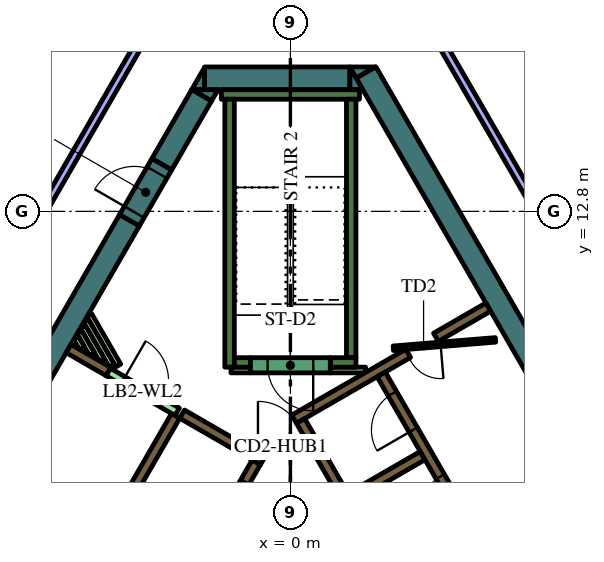
"""IFC4 building model, lengths in metres.
Left out: names, types, materials, properties, quantities, classifications, styles, units other than length and angle.
Written with IfcOpenShell. Run it as: python <this file> out.ifc"""

import sys

from ifc_helpers import new_model, si_unit, direction, frame, frame_2d, origin, place, context, subcontext, project, spatial, polyline, rectangle, outline, extrude, element, fill, save


model = new_model("IFC4")
c1 = context("Model", 3, precision=1e-05, world=origin(), true_north=direction((0.0, 1.0)))
c2 = subcontext(c1, "Body", "Model", "MODEL_VIEW")
j1 = project(units=[si_unit("LENGTHUNIT", "METRE"), si_unit("PLANEANGLEUNIT", "RADIAN")], contexts=[c1])
p1 = place(None, origin())
s1 = spatial("IfcSite", under=j1, at=p1, CompositionType="ELEMENT")
p2 = place(p1, origin())
s2 = spatial("IfcBuilding", under=s1, at=p2, CompositionType="ELEMENT")
p3 = place(p2, frame((0.0, 0.0, 279.6)))
s3 = spatial("IfcBuildingStorey", under=s2, at=p3, CompositionType="ELEMENT", Elevation=279.6)
p4 = place(p3, frame((1.989, 16.456, 0.0), z_axis=(0.0, 0.0, 1.0), x_axis=(0.49999102663, -0.8660305845, 0.0)))
e1 = element("IfcWall", 1, at=p4, inside=s3, PredefinedType="SOLIDWALL", context=c2, shape_type="SweptSolid", body=[
    extrude(rectangle(XDim=12.406, YDim=0.6, at=frame_2d((6.203, 0.0))), origin(), (0.0, 0.0, 1.0), 4.2),
])
p5 = place(p3, origin())
e2 = element("IfcWall", 2, at=p5, inside=s3, PredefinedType="SOLIDWALL", context=c2, shape_type="SweptSolid", body=[
    extrude(outline(polyline([(1.559, 16.6), (2.235, 16.6), (1.728, 16.307), (1.559, 16.6)])), origin(), (0.0, 0.0, 1.0), 4.2),
])
p6 = place(p3, frame((-2.258, 16.3, 0.0), z_axis=(0.0, 0.0, 1.0), x_axis=(1.0, 0.0, 0.0)))
e3 = element("IfcWall", 3, at=p6, inside=s3, PredefinedType="SOLIDWALL", context=c2, shape_type="SweptSolid", body=[
    extrude(rectangle(XDim=3.823, YDim=0.6, at=frame_2d((1.912, 0.0))), origin(), (0.0, 0.0, 1.0), 4.2),
])
e4 = element("IfcWall", 4, at=p5, inside=s3, PredefinedType="SOLIDWALL", context=c2, shape_type="SweptSolid", body=[
    extrude(outline(polyline([(1.905, 16.0), (1.567, 16.0), (1.567, 16.585), (1.905, 16.0)])), origin(), (0.0, 0.0, 1.0), 4.2),
])
e5 = element("IfcWall", 5, at=p5, inside=s3, PredefinedType="SOLIDWALL", context=c2, shape_type="SweptSolid", body=[
    extrude(outline(polyline([(-2.598, 16.0), (-2.26, 16.585), (-2.26, 16.0), (-2.598, 16.0)])), origin(), (0.0, 0.0, 1.0), 4.2),
])
p7 = place(p3, frame((-2.335, 15.855, 0.0), z_axis=(0.0, 0.0, 1.0), x_axis=(-0.499980971027, -0.866036389889, 0.0)))
e6 = element("IfcWall", 6, at=p7, inside=s3, PredefinedType="SOLIDWALL", context=c2, shape_type="SweptSolid", body=[
    extrude(rectangle(XDim=2.098, YDim=0.6, at=frame_2d((1.049, 0.0))), origin(), (0.0, 0.0, 1.0), 4.2),
])
e7 = element("IfcWall", 7, at=p5, inside=s3, PredefinedType="SOLIDWALL", context=c2, shape_type="SweptSolid", body=[
    extrude(outline(polyline([(-1.905, 16.0), (-2.074, 15.707), (-2.581, 16.0), (-1.905, 16.0)])), origin(), (0.0, 0.0, 1.0), 4.2),
])
p8 = place(p3, frame((-4.234, 12.566, 0.0), z_axis=(0.0, 0.0, 1.0), x_axis=(-0.499998841866, -0.866026072432, 0.0)))
e8 = element("IfcWall", 8, at=p8, inside=s3, PredefinedType="SOLIDWALL", context=c2, shape_type="SweptSolid", body=[
    extrude(rectangle(XDim=16.694, YDim=0.6, at=frame_2d((8.347, 0.0))), origin(), (0.0, 0.0, 1.0), 4.2),
])
p9 = place(p3, frame((-1.817, 15.875, 0.0), z_axis=(0.0, 0.0, 1.0), x_axis=(1.0, 0.0, 0.0)))
e9 = element("IfcWall", 9, at=p9, inside=s3, PredefinedType="SOLIDWALL", context=c2, shape_type="SweptSolid", body=[
    extrude(rectangle(XDim=3.634, YDim=0.25, at=frame_2d((1.817, 0.0))), origin(), (0.0, 0.0, 1.0), 4.2),
])
p10 = place(p3, frame((1.6, 8.95, 0.0), z_axis=(0.0, 0.0, 1.0), x_axis=(0.0, 1.0, 0.0)))
e10 = element("IfcWall", 10, at=p10, inside=s3, PredefinedType="SOLIDWALL", context=c2, shape_type="SweptSolid", body=[
    extrude(rectangle(XDim=6.8, YDim=0.25, at=frame_2d((3.4, 0.0))), origin(), (0.0, 0.0, 1.0), 4.2),
])
p11 = place(p3, frame((1.05, 8.825, 0.0), z_axis=(0.0, 0.0, 1.0), x_axis=(1.0, 0.0, 0.0)))
e11 = element("IfcWall", 11, at=p11, inside=s3, PredefinedType="SOLIDWALL", context=c2, shape_type="SweptSolid", body=[
    extrude(rectangle(XDim=0.675, YDim=0.25, at=frame_2d((0.337, 0.0))), origin(), (0.0, 0.0, 1.0), 4.2),
])
p12 = place(p3, frame((-1.6, 8.7, 0.0), z_axis=(0.0, 0.0, 1.0), x_axis=(0.0, 1.0, 0.0)))
e12 = element("IfcWall", 12, at=p12, inside=s3, PredefinedType="SOLIDWALL", context=c2, shape_type="SweptSolid", body=[
    extrude(rectangle(XDim=7.05, YDim=0.25, at=frame_2d((3.525, 0.0))), origin(), (0.0, 0.0, 1.0), 4.2),
])
p13 = place(p3, frame((-1.475, 8.825, 0.0), z_axis=(0.0, 0.0, 1.0), x_axis=(1.0, 0.0, 0.0)))
e13 = element("IfcWall", 13, at=p13, inside=s3, PredefinedType="SOLIDWALL", context=c2, shape_type="SweptSolid", body=[
    extrude(rectangle(XDim=0.425, YDim=0.25, at=frame_2d((0.212, 0.0))), origin(), (0.0, 0.0, 1.0), 4.2),
])
p14 = place(p3, frame((3.1, 9.064, 0.0), z_axis=(0.0, 0.0, 1.0), x_axis=(-0.866033137035, -0.499986605379, 0.0)))
e14 = element("IfcWall", 14, at=p14, inside=s3, PredefinedType="SOLIDWALL", context=c2, shape_type="SweptSolid", body=[
    extrude(rectangle(XDim=3.467, YDim=0.25, at=frame_2d((1.733, 0.0))), origin(), (0.0, 0.0, 1.0), 4.2),
])
p15 = place(p3, frame((0.268, 7.285, 0.0), z_axis=(0.0, 0.0, 1.0), x_axis=(0.500098681536, -0.865968422476, 0.0)))
e15 = element("IfcWall", 15, at=p15, inside=s3, PredefinedType="SOLIDWALL", context=c2, shape_type="SweptSolid", body=[
    extrude(rectangle(XDim=0.636, YDim=0.25, at=frame_2d((0.318, 0.0))), origin(), (0.0, 0.0, 1.0), 4.2),
])
p16 = place(p3, frame((5.97, -2.591, 0.0), z_axis=(0.0, 0.0, 1.0), x_axis=(-0.499994469932, 0.866028596547, 0.0)))
e16 = element("IfcWall", 16, at=p16, inside=s3, PredefinedType="SOLIDWALL", context=c2, shape_type="SweptSolid", body=[
    extrude(rectangle(XDim=10.488, YDim=0.25, at=frame_2d((5.244, 0.0))), origin(), (0.0, 0.0, 1.0), 4.2),
])
p17 = place(p3, frame((1.574, 5.274, 0.0), z_axis=(0.0, 0.0, 1.0), x_axis=(0.866028486751, 0.499994660107, 0.0)))
e17 = element("IfcWall", 17, at=p17, inside=s3, PredefinedType="SOLIDWALL", context=c2, shape_type="SweptSolid", body=[
    extrude(rectangle(XDim=2.2, YDim=0.25, at=frame_2d((1.1, 0.0))), origin(), (0.0, 0.0, 1.0), 4.2),
])
p18 = place(p3, frame((3.83, 9.486, 0.0), z_axis=(0.0, 0.0, 1.0), x_axis=(0.865986202621, 0.500067892261, 0.0)))
e18 = element("IfcWall", 18, at=p18, inside=s3, PredefinedType="SOLIDWALL", context=c2, shape_type="SweptSolid", body=[
    extrude(rectangle(XDim=1.591, YDim=0.25, at=frame_2d((0.795, 0.0))), origin(), (0.0, 0.0, 1.0), 4.2),
])
p19 = place(p3, frame((-3.02, 7.419, 0.0), z_axis=(0.0, 0.0, 1.0), x_axis=(-0.500022956343, -0.866012149528, 0.0)))
e19 = element("IfcWall", 19, at=p19, inside=s3, PredefinedType="SOLIDWALL", context=c2, shape_type="SweptSolid", body=[
    extrude(rectangle(XDim=10.08, YDim=0.25, at=frame_2d((5.04, 0.0))), origin(), (0.0, 0.0, 1.0), 4.2),
])
e20 = element("IfcWall", 20, at=p5, inside=s3, PredefinedType="SOLIDWALL", context=c2, shape_type="SweptSolid", body=[
    extrude(outline(polyline([(-2.912, 7.356), (-2.787, 7.573), (-1.232, 6.675), (-1.303, 6.675), (-1.304, 6.675), (-1.304, 6.675), (-1.304, 6.525), (-1.304, 6.525), (-1.303, 6.525), (-0.971, 6.525), (-0.665, 6.348), (-0.79, 6.132), (-1.007, 6.257), (-1.007, 6.257), (-2.912, 7.356)])), origin(), (0.0, 0.0, 1.0), 4.2),
])
p20 = place(p3, frame((-5.837, 9.19, 0.0), z_axis=(0.0, 0.0, 1.0), x_axis=(0.866024298998, -0.500001913541, 0.0)))
e21 = element("IfcWall", 21, at=p20, inside=s3, PredefinedType="SOLIDWALL", context=c2, shape_type="SweptSolid", body=[
    extrude(rectangle(XDim=1.21, YDim=0.25, at=frame_2d((0.605, 0.0))), origin(), (0.0, 0.0, 1.0), 4.2),
])
p21 = place(p3, frame((-5.294, 10.067, 0.0), z_axis=(0.0, 0.0, 1.0), x_axis=(0.500054140411, -0.865994143547, 0.0)))
e22 = element("IfcWall", 22, at=p21, inside=s3, PredefinedType="PARTITIONING", context=c2, shape_type="SweptSolid", body=[
    extrude(rectangle(XDim=1.529, YDim=0.15, at=frame_2d((0.765, 0.0))), origin(), (0.0, 0.0, 1.0), 3.55),
])
p22 = place(p3, frame((-5.381, 9.917, 0.0), z_axis=(0.0, 0.0, 1.0), x_axis=(0.500136970483, -0.865946309396, 0.0)))
e23 = element("IfcWall", 23, at=p22, inside=s3, PredefinedType="PARTITIONING", context=c2, shape_type="SweptSolid", body=[
    extrude(rectangle(XDim=1.359, YDim=0.15, at=frame_2d((0.68, 0.0))), origin(), (0.0, 0.0, 1.0), 3.55),
])
p23 = place(p3, frame((-5.467, 9.767, 0.0), z_axis=(0.0, 0.0, 1.0), x_axis=(0.500168849293, -0.86592789665, 0.0)))
e24 = element("IfcWall", 24, at=p23, inside=s3, PredefinedType="PARTITIONING", context=c2, shape_type="SweptSolid", body=[
    extrude(rectangle(XDim=1.01, YDim=0.15, at=frame_2d((0.505, 0.0))), origin(), (0.0, 0.0, 1.0), 3.55),
])
p24 = place(p3, frame((-5.554, 9.617, 0.0), z_axis=(0.0, 0.0, 1.0), x_axis=(0.500253084543, -0.86587923604, 0.0)))
e25 = element("IfcWall", 25, at=p24, inside=s3, PredefinedType="PARTITIONING", context=c2, shape_type="SweptSolid", body=[
    extrude(rectangle(XDim=0.664, YDim=0.15, at=frame_2d((0.332, 0.0))), origin(), (0.0, 0.0, 1.0), 3.55),
])
p25 = place(p3, frame((-5.64, 9.467, 0.0), z_axis=(0.0, 0.0, 1.0), x_axis=(0.499944387978, -0.86605750902, 0.0)))
e26 = element("IfcWall", 26, at=p25, inside=s3, PredefinedType="PARTITIONING", context=c2, shape_type="SweptSolid", body=[
    extrude(rectangle(XDim=0.317, YDim=0.15, at=frame_2d((0.159, 0.0))), origin(), (0.0, 0.0, 1.0), 3.55),
])
p26 = place(p3, frame((1.05, 8.625, 0.0), z_axis=(0.0, 0.0, 1.0), x_axis=(1.0, 0.0, 0.0)))
e27 = element("IfcWall", 27, at=p26, inside=s3, PredefinedType="PARTITIONING", context=c2, shape_type="SweptSolid", body=[
    extrude(rectangle(XDim=0.929, YDim=0.15, at=frame_2d((0.464, 0.0))), origin(), (0.0, 0.0, 1.0), 3.55),
])
p27 = place(p3, frame((-1.564, 8.625, 0.0), z_axis=(0.0, 0.0, 1.0), x_axis=(1.0, 0.0, 0.0)))
e28 = element("IfcWall", 28, at=p27, inside=s3, PredefinedType="PARTITIONING", context=c2, shape_type="SweptSolid", body=[
    extrude(rectangle(XDim=0.514, YDim=0.15, at=frame_2d((0.257, 0.0))), origin(), (0.0, 0.0, 1.0), 3.55),
])
p28 = place(p3, frame((8.565, -2.185, 0.0), z_axis=(0.0, 0.0, 1.0), x_axis=(-0.499997954832, 0.866026584559, 0.0)))
e29 = element("IfcWall", 29, at=p28, inside=s3, PredefinedType="SOLIDWALL", context=c2, shape_type="SweptSolid", body=[
    extrude(rectangle(XDim=12.35, YDim=0.25, at=frame_2d((6.175, 0.0))), origin(), (0.0, 0.0, 1.0), 4.2),
])
p29 = place(p28, frame((0.685, 0.0, 0.0)))
e30 = element("IfcOpeningElement", 30, at=p29, cuts=e29, PredefinedType="OPENING", context=c2, shape_type="SweptSolid", body=[
    extrude(rectangle(XDim=0.9, YDim=2.1, at=frame_2d((0.45, 1.05))), frame((0.0, 0.135, 0.0), z_axis=(0.0, -1.0, 0.0), x_axis=(1.0, 0.0, 0.0)), (0.0, 0.0, 1.0), 0.27),
])
p30 = place(p28, frame((3.105, 0.0, 0.0)))
e31 = element("IfcOpeningElement", 31, at=p30, cuts=e29, PredefinedType="OPENING", context=c2, shape_type="SweptSolid", body=[
    extrude(rectangle(XDim=1.1, YDim=2.1, at=frame_2d((0.55, 1.05))), frame((0.0, 0.135, 0.0), z_axis=(0.0, -1.0, 0.0), x_axis=(1.0, 0.0, 0.0)), (0.0, 0.0, 1.0), 0.27),
])
p31 = place(p28, frame((5.625, 0.0, 0.0)))
e32 = element("IfcOpeningElement", 32, at=p31, cuts=e29, PredefinedType="OPENING", context=c2, shape_type="SweptSolid", body=[
    extrude(rectangle(XDim=1.1, YDim=2.1, at=frame_2d((0.55, 1.05))), frame((0.0, 0.135, 0.0), z_axis=(0.0, -1.0, 0.0), x_axis=(1.0, 0.0, 0.0)), (0.0, 0.0, 1.0), 0.27),
])
p32 = place(p28, frame((8.145, 0.0, 0.0)))
e33 = element("IfcOpeningElement", 33, at=p32, cuts=e29, PredefinedType="OPENING", context=c2, shape_type="SweptSolid", body=[
    extrude(rectangle(XDim=1.1, YDim=2.1, at=frame_2d((0.55, 1.05))), frame((0.0, 0.135, 0.0), z_axis=(0.0, -1.0, 0.0), x_axis=(1.0, 0.0, 0.0)), (0.0, 0.0, 1.0), 0.27),
])
p33 = place(p28, frame((10.665, 0.0, 0.0)))
e34 = element("IfcOpeningElement", 34, at=p33, cuts=e29, PredefinedType="OPENING", context=c2, shape_type="SweptSolid", body=[
    extrude(rectangle(XDim=1.1, YDim=2.1, at=frame_2d((0.55, 1.05))), frame((0.0, 0.135, 0.0), z_axis=(0.0, -1.0, 0.0), x_axis=(1.0, 0.0, 0.0)), (0.0, 0.0, 1.0), 0.27),
])
p34 = place(p3, frame((-0.898, 6.194, 0.0), z_axis=(0.0, 0.0, 1.0), x_axis=(-0.499996202215, -0.866027596426, 0.0)))
e35 = element("IfcWall", 35, at=p34, inside=s3, PredefinedType="SOLIDWALL", context=c2, shape_type="SweptSolid", body=[
    extrude(rectangle(XDim=9.83, YDim=0.25, at=frame_2d((4.915, 0.0))), origin(), (0.0, 0.0, 1.0), 4.2),
])
p35 = place(p34, frame((0.585, 0.0, 0.0)))
e36 = element("IfcOpeningElement", 36, at=p35, cuts=e35, PredefinedType="OPENING", context=c2, shape_type="SweptSolid", body=[
    extrude(rectangle(XDim=1.1, YDim=2.1, at=frame_2d((0.55, 1.05))), frame((0.0, 0.135, 0.0), z_axis=(0.0, -1.0, 0.0), x_axis=(1.0, 0.0, 0.0)), (0.0, 0.0, 1.0), 0.27),
])
p36 = place(p34, frame((3.105, 0.0, 0.0)))
e37 = element("IfcOpeningElement", 37, at=p36, cuts=e35, PredefinedType="OPENING", context=c2, shape_type="SweptSolid", body=[
    extrude(rectangle(XDim=1.1, YDim=2.1, at=frame_2d((0.55, 1.05))), frame((0.0, 0.135, 0.0), z_axis=(0.0, -1.0, 0.0), x_axis=(1.0, 0.0, 0.0)), (0.0, 0.0, 1.0), 0.27),
])
p37 = place(p34, frame((5.625, 0.0, 0.0)))
e38 = element("IfcOpeningElement", 38, at=p37, cuts=e35, PredefinedType="OPENING", context=c2, shape_type="SweptSolid", body=[
    extrude(rectangle(XDim=1.1, YDim=2.1, at=frame_2d((0.55, 1.05))), frame((0.0, 0.135, 0.0), z_axis=(0.0, -1.0, 0.0), x_axis=(1.0, 0.0, 0.0)), (0.0, 0.0, 1.0), 0.27),
])
p38 = place(p34, frame((8.145, 0.0, 0.0)))
e39 = element("IfcOpeningElement", 39, at=p38, cuts=e35, PredefinedType="OPENING", context=c2, shape_type="SweptSolid", body=[
    extrude(rectangle(XDim=1.1, YDim=2.1, at=frame_2d((0.55, 1.05))), frame((0.0, 0.135, 0.0), z_axis=(0.0, -1.0, 0.0), x_axis=(1.0, 0.0, 0.0)), (0.0, 0.0, 1.0), 0.27),
])
p39 = place(p3, frame((1.05, 8.75, 0.0), z_axis=(0.0, 0.0, 1.0), x_axis=(-1.0, 0.0, 0.0)))
e40 = element("IfcWall", 40, at=p39, inside=s3, PredefinedType="SOLIDWALL", context=c2, shape_type="SweptSolid", body=[
    extrude(rectangle(XDim=2.1, YDim=0.4, at=frame_2d((1.05, 0.0))), origin(), (0.0, 0.0, 1.0), 4.2),
])
p40 = place(p39, frame((0.45, 0.0, 0.0)))
e41 = element("IfcOpeningElement", 41, at=p40, cuts=e40, PredefinedType="OPENING", context=c2, shape_type="SweptSolid", body=[
    extrude(rectangle(XDim=1.2, YDim=2.1, at=frame_2d((0.6, 1.05))), frame((0.0, 0.21, 0.0), z_axis=(0.0, -1.0, 0.0), x_axis=(1.0, 0.0, 0.0)), (0.0, 0.0, 1.0), 0.42),
])
p41 = place(p3, frame((5.398, 9.419, 0.0), z_axis=(0.0, 0.0, 1.0), x_axis=(-0.996653416376, -0.081743303248, 0.0)))
e42 = element("IfcWall", 42, at=p41, inside=s3, PredefinedType="PARTITIONING", context=c2, shape_type="SweptSolid", body=[
    extrude(rectangle(XDim=2.7, YDim=0.12, at=frame_2d((1.35, 0.0))), origin(), (0.0, 0.0, 1.0), 3.55),
])
p42 = place(p41, frame((1.45, 0.0, 0.0)))
e43 = element("IfcOpeningElement", 43, at=p42, cuts=e42, PredefinedType="OPENING", context=c2, shape_type="SweptSolid", body=[
    extrude(rectangle(XDim=0.9, YDim=2.1, at=frame_2d((0.45, 1.05))), frame((0.0, 0.07, 0.0), z_axis=(0.0, -1.0, 0.0), x_axis=(1.0, 0.0, 0.0)), (0.0, 0.0, 1.0), 0.14),
])
p43 = place(p3, frame((-1.303, 6.6, 0.0), z_axis=(0.0, 0.0, 1.0), x_axis=(1.0, 0.0, 0.0)))
e44 = element("IfcWall", 44, at=p43, inside=s3, PredefinedType="PARTITIONING", context=c2, shape_type="SweptSolid", body=[
    extrude(rectangle(XDim=2.1, YDim=0.15, at=frame_2d((1.05, 0.0))), origin(), (0.0, 0.0, 1.0), 4.2),
])
p44 = place(p43, frame((0.45, 0.0, 0.0)))
e45 = element("IfcOpeningElement", 45, at=p44, cuts=e44, PredefinedType="OPENING", context=c2, shape_type="SweptSolid", body=[
    extrude(rectangle(XDim=1.2, YDim=2.1, at=frame_2d((0.6, 1.05))), frame((0.0, 0.085, 0.0), z_axis=(0.0, -1.0, 0.0), x_axis=(1.0, 0.0, 0.0)), (0.0, 0.0, 1.0), 0.17),
])
p45 = place(p3, frame((-4.796, 8.575, 0.0), z_axis=(0.0, 0.0, 1.0), x_axis=(0.866009402589, -0.500027713859, 0.0)))
e46 = element("IfcWall", 46, at=p45, inside=s3, PredefinedType="PARTITIONING", context=c2, shape_type="SweptSolid", body=[
    extrude(rectangle(XDim=2.1, YDim=0.226, at=frame_2d((1.05, 0.0))), origin(), (0.0, 0.0, 1.0), 3.55),
])
p46 = place(p45, frame((0.45, 0.0, 0.0)))
e47 = element("IfcOpeningElement", 47, at=p46, cuts=e46, PredefinedType="OPENING", context=c2, shape_type="SweptSolid", body=[
    extrude(rectangle(XDim=1.2, YDim=2.1, at=frame_2d((0.6, 1.05))), frame((0.0, 0.123, 0.0), z_axis=(0.0, -1.0, 0.0), x_axis=(1.0, 0.0, 0.0)), (0.0, 0.0, 1.0), 0.246),
])
p47 = place(p3, frame((-4.234, 12.566, 0.0), z_axis=(0.0, 0.0, 1.0), x_axis=(0.500000056704, 0.866025371046, 0.0)))
e48 = element("IfcWall", 48, at=p47, inside=s3, PredefinedType="SOLIDWALL", context=c2, shape_type="SweptSolid", body=[
    extrude(rectangle(XDim=1.7, YDim=0.6, at=frame_2d((0.85, 0.0))), origin(), (0.0, 0.0, 1.0), 4.2),
])
p48 = place(p47, frame((0.25, 0.0, 0.0)))
e49 = element("IfcOpeningElement", 49, at=p48, cuts=e48, PredefinedType="OPENING", context=c2, shape_type="SweptSolid", body=[
    extrude(rectangle(XDim=1.2, YDim=2.1, at=frame_2d((0.6, 1.05))), frame((0.0, 0.31, 0.0), z_axis=(0.0, -1.0, 0.0), x_axis=(1.0, 0.0, 0.0)), (0.0, 0.0, 1.0), 0.62),
])
p49 = place(p3, frame((7.421, 11.247, 0.0), z_axis=(0.0, 0.0, 1.0), x_axis=(-0.499999024953, 0.866025966727, 0.0)))
e50 = element("IfcWall", 50, at=p49, inside=s3, PredefinedType="PARTITIONING", context=c2, shape_type="SweptSolid", body=[
    extrude(rectangle(XDim=7.769, YDim=0.2, at=frame_2d((3.884, 0.0))), origin(), (0.0, 0.0, 1.0), 3.55),
])
p50 = place(p3, frame((-7.962, 15.8, 0.0), z_axis=(0.0, 0.0, 1.0), x_axis=(0.599541489613, 0.800343677574, 0.0)))
e51 = element("IfcWall", 51, at=p50, inside=s3, PredefinedType="PARTITIONING", context=c2, shape_type="SweptSolid", body=[
    extrude(rectangle(XDim=4.942, YDim=0.15, at=frame_2d((2.471, 0.0))), origin(), (0.0, 0.0, 1.0), 3.55),
])
p51 = place(p50, frame((2.042, 0.0, 0.0)))
e52 = element("IfcOpeningElement", 52, at=p51, cuts=e51, PredefinedType="OPENING", context=c2, shape_type="SweptSolid", body=[
    extrude(rectangle(XDim=0.9, YDim=2.1, at=frame_2d((0.45, 1.05))), frame((0.0, 0.085, 0.0), z_axis=(0.0, -1.0, 0.0), x_axis=(1.0, 0.0, 0.0)), (0.0, 0.0, 1.0), 0.17),
])
p52 = place(p3, frame((-3.306, 18.374, 0.0), z_axis=(0.0, 0.0, 1.0), x_axis=(-0.499999798456, -0.866025520146, 0.0)))
e53 = element("IfcWall", 53, at=p52, inside=s3, PredefinedType="PARTITIONING", context=c2, shape_type="SweptSolid", body=[
    extrude(rectangle(XDim=8.229, YDim=0.2, at=frame_2d((4.115, 0.0))), origin(), (0.0, 0.0, 1.0), 3.55),
])
p53 = place(p32, origin())
e54 = element("IfcDoor", 54, at=p53, inside=s3, OperationType="DOUBLE_DOOR_SLIDING", PredefinedType="DOOR", context=c2, shape_type="SweptSolid", body=[
    extrude(rectangle(XDim=1.1, YDim=2.1, at=frame_2d((0.55, 1.05))), frame((0.0, 0.025, 0.0), z_axis=(0.0, -1.0, 0.0), x_axis=(1.0, 0.0, 0.0)), (0.0, 0.0, 1.0), 0.05),
])
fill(e33, e54)
p54 = place(p33, origin())
e55 = element("IfcDoor", 55, at=p54, inside=s3, OperationType="DOUBLE_DOOR_SLIDING", PredefinedType="DOOR", context=c2, shape_type="SweptSolid", body=[
    extrude(rectangle(XDim=1.1, YDim=2.1, at=frame_2d((0.55, 1.05))), frame((0.0, 0.025, 0.0), z_axis=(0.0, -1.0, 0.0), x_axis=(1.0, 0.0, 0.0)), (0.0, 0.0, 1.0), 0.05),
])
fill(e34, e55)
p55 = place(p35, origin())
e56 = element("IfcDoor", 56, at=p55, inside=s3, OperationType="DOUBLE_DOOR_SLIDING", PredefinedType="DOOR", context=c2, shape_type="SweptSolid", body=[
    extrude(rectangle(XDim=1.1, YDim=2.1, at=frame_2d((0.55, 1.05))), frame((0.0, 0.025, 0.0), z_axis=(0.0, -1.0, 0.0), x_axis=(1.0, 0.0, 0.0)), (0.0, 0.0, 1.0), 0.05),
])
fill(e36, e56)
p56 = place(p40, origin())
e57 = element("IfcDoor", 57, at=p56, inside=s3, OperationType="SINGLE_SWING_LEFT", PredefinedType="DOOR", context=c2, shape_type="SweptSolid", body=[
    extrude(rectangle(XDim=1.2, YDim=2.1, at=frame_2d((0.6, 1.05))), frame((0.0, 0.025, 0.0), z_axis=(0.0, -1.0, 0.0), x_axis=(1.0, 0.0, 0.0)), (0.0, 0.0, 1.0), 0.05),
])
fill(e41, e57)
p57 = place(p42, origin())
e58 = element("IfcDoor", 58, at=p57, inside=s3, OperationType="SINGLE_SWING_LEFT", PredefinedType="DOOR", context=c2, shape_type="SweptSolid", body=[
    extrude(rectangle(XDim=0.9, YDim=2.1, at=frame_2d((0.45, 1.05))), frame((0.0, 0.025, 0.0), z_axis=(0.0, -1.0, 0.0), x_axis=(1.0, 0.0, 0.0)), (0.0, 0.0, 1.0), 0.05),
])
fill(e43, e58)
p58 = place(p44, origin())
e59 = element("IfcDoor", 59, at=p58, inside=s3, OperationType="SINGLE_SWING_LEFT", PredefinedType="DOOR", context=c2, shape_type="SweptSolid", body=[
    extrude(rectangle(XDim=1.2, YDim=2.1, at=frame_2d((0.6, 1.05))), frame((0.0, 0.025, 0.0), z_axis=(0.0, -1.0, 0.0), x_axis=(1.0, 0.0, 0.0)), (0.0, 0.0, 1.0), 0.05),
])
fill(e45, e59)
p59 = place(p46, origin())
e60 = element("IfcDoor", 60, at=p59, inside=s3, OperationType="SINGLE_SWING_LEFT", PredefinedType="DOOR", context=c2, shape_type="SweptSolid", body=[
    extrude(rectangle(XDim=1.2, YDim=2.1, at=frame_2d((0.6, 1.05))), frame((0.0, 0.025, 0.0), z_axis=(0.0, -1.0, 0.0), x_axis=(1.0, 0.0, 0.0)), (0.0, 0.0, 1.0), 0.05),
])
fill(e47, e60)
p60 = place(p48, origin())
e61 = element("IfcDoor", 61, at=p60, inside=s3, OperationType="SINGLE_SWING_LEFT", PredefinedType="DOOR", context=c2, shape_type="SweptSolid", body=[
    extrude(rectangle(XDim=1.2, YDim=2.1, at=frame_2d((0.6, 1.05))), frame((0.0, 0.025, 0.0), z_axis=(0.0, -1.0, 0.0), x_axis=(1.0, 0.0, 0.0)), (0.0, 0.0, 1.0), 0.05),
])
fill(e49, e61)
save(model, sys.argv[1])
